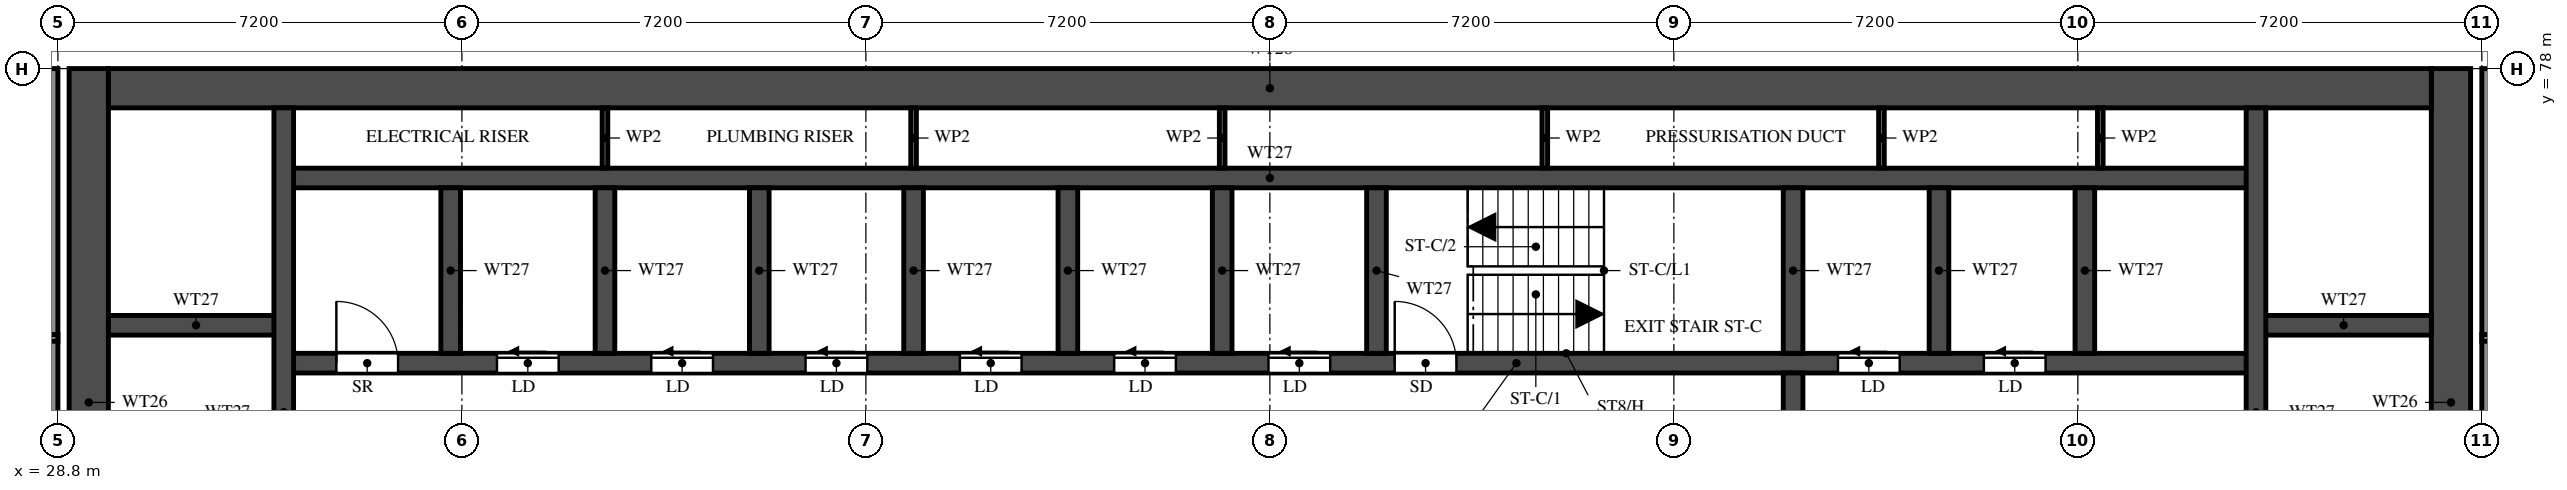
"""IFC4 building model, lengths in metres.
Left out: names, types, materials, properties, quantities, classifications, styles, units other than length and angle.
Written with IfcOpenShell. Run it as: python <this file> out.ifc"""

import sys

from ifc_helpers import new_model, si_unit, direction, frame, frame_2d, origin, place, context, subcontext, project, spatial, rectangle, extrude, element, fill, save


model = new_model("IFC4")
c1 = context("Model", 3, precision=1e-05, world=origin(), true_north=direction((0.0, 1.0)))
c2 = subcontext(c1, "Body", "Model", "MODEL_VIEW")
j1 = project(units=[si_unit("LENGTHUNIT", "METRE"), si_unit("PLANEANGLEUNIT", "RADIAN")], contexts=[c1])
p1 = place(None, origin())
s1 = spatial("IfcSite", under=j1, at=p1, CompositionType="ELEMENT")
p2 = place(p1, origin())
s2 = spatial("IfcBuilding", under=s1, at=p2, CompositionType="ELEMENT")
p3 = place(p2, frame((0.0, 0.0, 188.5)))
s3 = spatial("IfcBuildingStorey", under=s2, at=p3, CompositionType="ELEMENT", Elevation=188.5)
for number, where, z_axis, x_axis in (
    (1, (29.35, 66.1, 0.0), (0.0, 0.0, 1.0), (0.0, 1.0, 0.0)),
    (2, (71.45, 66.1, 0.0), (0.0, 0.0, 1.0), (0.0, 1.0, 0.0)),
):
    element("IfcWall", number, at=place(p3, frame(where, z_axis=z_axis, x_axis=x_axis)), inside=s3, PredefinedType="SHEAR", context=c2, shape_type="SweptSolid", body=[
        extrude(rectangle(XDim=11.9, YDim=0.7, at=frame_2d((5.95, 0.0))), origin(), (0.0, 0.0, 1.0), 3.2),
    ])
p4 = place(p3, frame((29.7, 77.65, 0.0), z_axis=(0.0, 0.0, 1.0), x_axis=(1.0, 0.0, 0.0)))
e3 = element("IfcWall", 3, at=p4, inside=s3, PredefinedType="SHEAR", context=c2, shape_type="SweptSolid", body=[
    extrude(rectangle(XDim=41.4, YDim=0.7, at=frame_2d((20.7, 0.0))), origin(), (0.0, 0.0, 1.0), 3.2),
])
p5 = place(p3, frame((32.825, 72.75, 0.0), z_axis=(0.0, 0.0, 1.0), x_axis=(1.0, 0.0, 0.0)))
e4 = element("IfcWall", 4, at=p5, inside=s3, PredefinedType="SHEAR", context=c2, shape_type="SweptSolid", body=[
    extrude(rectangle(XDim=35.15, YDim=0.35, at=frame_2d((17.575, 0.0))), origin(), (0.0, 0.0, 1.0), 3.2),
])
p6 = place(p5, frame((19.8, 0.0, 0.0)))
e5 = element("IfcOpeningElement", 5, at=p6, cuts=e4, PredefinedType="OPENING", context=c2, shape_type="SweptSolid", body=[
    extrude(rectangle(XDim=1.1, YDim=2.1, at=frame_2d((0.55, 1.05))), frame((0.0, 0.185, 0.0), z_axis=(0.0, -1.0, 0.0), x_axis=(1.0, 0.0, 0.0)), (0.0, 0.0, 1.0), 0.37),
])
p7 = place(p5, frame((27.7, 0.0, 0.0)))
e6 = element("IfcOpeningElement", 6, at=p7, cuts=e4, PredefinedType="OPENING", context=c2, shape_type="SweptSolid", body=[
    extrude(rectangle(XDim=1.1, YDim=2.1, at=frame_2d((0.55, 1.05))), frame((0.0, 0.185, 0.0), z_axis=(0.0, -1.0, 0.0), x_axis=(1.0, 0.0, 0.0)), (0.0, 0.0, 1.0), 0.37),
])
p8 = place(p5, frame((30.3, 0.0, 0.0)))
e7 = element("IfcOpeningElement", 7, at=p8, cuts=e4, PredefinedType="OPENING", context=c2, shape_type="SweptSolid", body=[
    extrude(rectangle(XDim=1.1, YDim=2.1, at=frame_2d((0.55, 1.05))), frame((0.0, 0.185, 0.0), z_axis=(0.0, -1.0, 0.0), x_axis=(1.0, 0.0, 0.0)), (0.0, 0.0, 1.0), 0.37),
])
p9 = place(p5, frame((3.8, 0.0, 0.0)))
e8 = element("IfcOpeningElement", 8, at=p9, cuts=e4, PredefinedType="OPENING", context=c2, shape_type="SweptSolid", body=[
    extrude(rectangle(XDim=1.1, YDim=2.1, at=frame_2d((0.55, 1.05))), frame((0.0, 0.185, 0.0), z_axis=(0.0, -1.0, 0.0), x_axis=(1.0, 0.0, 0.0)), (0.0, 0.0, 1.0), 0.37),
])
p10 = place(p5, frame((6.55, 0.0, 0.0)))
e9 = element("IfcOpeningElement", 9, at=p10, cuts=e4, PredefinedType="OPENING", context=c2, shape_type="SweptSolid", body=[
    extrude(rectangle(XDim=1.1, YDim=2.1, at=frame_2d((0.55, 1.05))), frame((0.0, 0.185, 0.0), z_axis=(0.0, -1.0, 0.0), x_axis=(1.0, 0.0, 0.0)), (0.0, 0.0, 1.0), 0.37),
])
p11 = place(p5, frame((9.3, 0.0, 0.0)))
e10 = element("IfcOpeningElement", 10, at=p11, cuts=e4, PredefinedType="OPENING", context=c2, shape_type="SweptSolid", body=[
    extrude(rectangle(XDim=1.1, YDim=2.1, at=frame_2d((0.55, 1.05))), frame((0.0, 0.185, 0.0), z_axis=(0.0, -1.0, 0.0), x_axis=(1.0, 0.0, 0.0)), (0.0, 0.0, 1.0), 0.37),
])
p12 = place(p5, frame((12.05, 0.0, 0.0)))
e11 = element("IfcOpeningElement", 11, at=p12, cuts=e4, PredefinedType="OPENING", context=c2, shape_type="SweptSolid", body=[
    extrude(rectangle(XDim=1.1, YDim=2.1, at=frame_2d((0.55, 1.05))), frame((0.0, 0.185, 0.0), z_axis=(0.0, -1.0, 0.0), x_axis=(1.0, 0.0, 0.0)), (0.0, 0.0, 1.0), 0.37),
])
p13 = place(p5, frame((14.8, 0.0, 0.0)))
e12 = element("IfcOpeningElement", 12, at=p13, cuts=e4, PredefinedType="OPENING", context=c2, shape_type="SweptSolid", body=[
    extrude(rectangle(XDim=1.1, YDim=2.1, at=frame_2d((0.55, 1.05))), frame((0.0, 0.185, 0.0), z_axis=(0.0, -1.0, 0.0), x_axis=(1.0, 0.0, 0.0)), (0.0, 0.0, 1.0), 0.37),
])
p14 = place(p5, frame((17.55, 0.0, 0.0)))
e13 = element("IfcOpeningElement", 13, at=p14, cuts=e4, PredefinedType="OPENING", context=c2, shape_type="SweptSolid", body=[
    extrude(rectangle(XDim=1.1, YDim=2.1, at=frame_2d((0.55, 1.05))), frame((0.0, 0.185, 0.0), z_axis=(0.0, -1.0, 0.0), x_axis=(1.0, 0.0, 0.0)), (0.0, 0.0, 1.0), 0.37),
])
p15 = place(p5, frame((0.938, 0.0, 0.0)))
e14 = element("IfcOpeningElement", 14, at=p15, cuts=e4, PredefinedType="OPENING", context=c2, shape_type="SweptSolid", body=[
    extrude(rectangle(XDim=1.1, YDim=2.1, at=frame_2d((0.55, 1.05))), frame((0.0, 0.185, 0.0), z_axis=(0.0, -1.0, 0.0), x_axis=(1.0, 0.0, 0.0)), (0.0, 0.0, 1.0), 0.37),
])
p16 = place(p3, frame((32.825, 76.05, 0.0), z_axis=(0.0, 0.0, 1.0), x_axis=(1.0, 0.0, 0.0)))
e15 = element("IfcWall", 15, at=p16, inside=s3, PredefinedType="SHEAR", context=c2, shape_type="SweptSolid", body=[
    extrude(rectangle(XDim=35.15, YDim=0.35, at=frame_2d((17.575, 0.0))), origin(), (0.0, 0.0, 1.0), 3.2),
])
for number, where, z_axis, x_axis in (
    (16, (29.7, 73.425, 0.0), (0.0, 0.0, 1.0), (1.0, 0.0, 0.0)),
    (17, (67.975, 73.425, 0.0), (0.0, 0.0, 1.0), (1.0, 0.0, 0.0)),
):
    element("IfcWall", number, at=place(p3, frame(where, z_axis=z_axis, x_axis=x_axis)), inside=s3, PredefinedType="SHEAR", context=c2, shape_type="SweptSolid", body=[
        extrude(rectangle(XDim=3.125, YDim=0.35, at=frame_2d((1.562, 0.0))), origin(), (0.0, 0.0, 1.0), 3.2),
    ])
p17 = place(p3, frame((32.825, 66.45, 0.0), z_axis=(0.0, 0.0, 1.0), x_axis=(0.0, 1.0, 0.0)))
e18 = element("IfcWall", 18, at=p17, inside=s3, PredefinedType="SHEAR", context=c2, shape_type="SweptSolid", body=[
    extrude(rectangle(XDim=10.85, YDim=0.35, at=frame_2d((5.425, 0.0))), origin(), (0.0, 0.0, 1.0), 3.2),
])
p18 = place(p3, frame((67.975, 66.45, 0.0), z_axis=(0.0, 0.0, 1.0), x_axis=(0.0, 1.0, 0.0)))
e19 = element("IfcWall", 19, at=p18, inside=s3, PredefinedType="SHEAR", context=c2, shape_type="SweptSolid", body=[
    extrude(rectangle(XDim=10.85, YDim=0.35, at=frame_2d((5.425, 0.0))), origin(), (0.0, 0.0, 1.0), 3.2),
])
p19 = place(p18, frame((0.15, 0.0, 0.0)))
e20 = element("IfcOpeningElement", 20, at=p19, cuts=e19, PredefinedType="OPENING", context=c2, shape_type="SweptSolid", body=[
    extrude(rectangle(XDim=1.1, YDim=2.1, at=frame_2d((0.55, 1.05))), frame((0.0, 0.185, 0.0), z_axis=(0.0, -1.0, 0.0), x_axis=(1.0, 0.0, 0.0)), (0.0, 0.0, 1.0), 0.37),
])
p20 = place(p3, frame((59.725, 66.45, 0.0), z_axis=(0.0, 0.0, 1.0), x_axis=(0.0, 1.0, 0.0)))
e21 = element("IfcWall", 21, at=p20, inside=s3, PredefinedType="SHEAR", context=c2, shape_type="SweptSolid", body=[
    extrude(rectangle(XDim=6.125, YDim=0.35, at=frame_2d((3.062, 0.0))), origin(), (0.0, 0.0, 1.0), 3.2),
])
p21 = place(p20, frame((3.85, 0.0, 0.0)))
e22 = element("IfcOpeningElement", 22, at=p21, cuts=e21, PredefinedType="OPENING", context=c2, shape_type="SweptSolid", body=[
    extrude(rectangle(XDim=1.2, YDim=2.1, at=frame_2d((0.6, 1.05))), frame((0.0, 0.185, 0.0), z_axis=(0.0, -1.0, 0.0), x_axis=(1.0, 0.0, 0.0)), (0.0, 0.0, 1.0), 0.37),
])
for number, where, z_axis, x_axis in (
    (23, (59.725, 72.925, 0.0), (0.0, 0.0, 1.0), (0.0, 1.0, 0.0)),
    (24, (35.8, 72.925, 0.0), (0.0, 0.0, 1.0), (0.0, 1.0, 0.0)),
    (25, (38.55, 72.925, 0.0), (0.0, 0.0, 1.0), (0.0, 1.0, 0.0)),
    (26, (41.3, 72.925, 0.0), (0.0, 0.0, 1.0), (0.0, 1.0, 0.0)),
    (27, (44.05, 72.925, 0.0), (0.0, 0.0, 1.0), (0.0, 1.0, 0.0)),
    (28, (46.8, 72.925, 0.0), (0.0, 0.0, 1.0), (0.0, 1.0, 0.0)),
    (29, (49.55, 72.925, 0.0), (0.0, 0.0, 1.0), (0.0, 1.0, 0.0)),
    (30, (52.3, 72.925, 0.0), (0.0, 0.0, 1.0), (0.0, 1.0, 0.0)),
    (31, (62.325, 72.925, 0.0), (0.0, 0.0, 1.0), (0.0, 1.0, 0.0)),
    (32, (64.925, 72.925, 0.0), (0.0, 0.0, 1.0), (0.0, 1.0, 0.0)),
):
    element("IfcWall", number, at=place(p3, frame(where, z_axis=z_axis, x_axis=x_axis)), inside=s3, PredefinedType="SHEAR", context=c2, shape_type="SweptSolid", body=[
        extrude(rectangle(XDim=2.95, YDim=0.35, at=frame_2d((1.475, 0.0))), origin(), (0.0, 0.0, 1.0), 3.2),
    ])
for number, where, z_axis, x_axis in (
    (33, (38.55, 76.225, 0.0), (0.0, 0.0, 1.0), (0.0, 1.0, 0.0)),
    (34, (44.05, 76.225, 0.0), (0.0, 0.0, 1.0), (0.0, 1.0, 0.0)),
    (35, (49.55, 76.225, 0.0), (0.0, 0.0, 1.0), (0.0, 1.0, 0.0)),
    (36, (55.3, 76.225, 0.0), (0.0, 0.0, 1.0), (0.0, 1.0, 0.0)),
    (37, (61.3, 76.225, 0.0), (0.0, 0.0, 1.0), (0.0, 1.0, 0.0)),
    (38, (65.2, 76.225, 0.0), (0.0, 0.0, 1.0), (0.0, 1.0, 0.0)),
):
    element("IfcWall", number, at=place(p3, frame(where, z_axis=z_axis, x_axis=x_axis)), inside=s3, PredefinedType="PARTITIONING", context=c2, shape_type="SweptSolid", body=[
        extrude(rectangle(XDim=1.075, YDim=0.1, at=frame_2d((0.538, 0.0))), origin(), (0.0, 0.0, 1.0), 3.2),
    ])
for number, where, z_axis, x_axis in (
    (39, (28.7, 62.4, 0.0), (0.0, 0.0, 1.0), (0.0, 1.0, 0.0)),
    (40, (72.1, 62.4, 0.0), (0.0, 0.0, 1.0), (0.0, 1.0, 0.0)),
):
    element("IfcWall", number, at=place(p3, frame(where, z_axis=z_axis, x_axis=x_axis)), inside=s3, PredefinedType="SOLIDWALL", context=c2, shape_type="SweptSolid", body=[
        extrude(rectangle(XDim=15.6, YDim=0.2, at=frame_2d((7.8, 0.0))), origin(), (0.0, 0.0, 1.0), 3.2),
    ])
p22 = place(p3, frame((14.525, 73.2, 0.0), z_axis=(0.0, 0.0, 1.0), x_axis=(1.0, 0.0, 0.0)))
e41 = element("IfcWall", 41, at=p22, inside=s3, PredefinedType="PARTITIONING", context=c2, shape_type="SweptSolid", body=[
    extrude(rectangle(XDim=14.275, YDim=0.12, at=frame_2d((7.138, 0.0))), origin(), (0.0, 0.0, 1.0), 2.3),
])
p23 = place(p22, frame((7.675, 0.0, 0.0)))
e42 = element("IfcOpeningElement", 42, at=p23, cuts=e41, PredefinedType="OPENING", context=c2, shape_type="SweptSolid", body=[
    extrude(rectangle(XDim=0.9, YDim=2.1, at=frame_2d((0.45, 1.05))), frame((0.0, 0.07, 0.0), z_axis=(0.0, -1.0, 0.0), x_axis=(1.0, 0.0, 0.0)), (0.0, 0.0, 1.0), 0.14),
])
p24 = place(p3, frame((72.0, 73.2, 0.0), z_axis=(0.0, 0.0, 1.0), x_axis=(1.0, 0.0, 0.0)))
e43 = element("IfcWall", 43, at=p24, inside=s3, PredefinedType="PARTITIONING", context=c2, shape_type="SweptSolid", body=[
    extrude(rectangle(XDim=14.275, YDim=0.12, at=frame_2d((7.137, 0.0))), origin(), (0.0, 0.0, 1.0), 2.3),
])
p25 = place(p24, frame((5.7, 0.0, 0.0)))
e44 = element("IfcOpeningElement", 44, at=p25, cuts=e43, PredefinedType="OPENING", context=c2, shape_type="SweptSolid", body=[
    extrude(rectangle(XDim=0.9, YDim=2.1, at=frame_2d((0.45, 1.05))), frame((0.0, 0.07, 0.0), z_axis=(0.0, -1.0, 0.0), x_axis=(1.0, 0.0, 0.0)), (0.0, 0.0, 1.0), 0.14),
])
p26 = place(p6, origin())
e45 = element("IfcDoor", 45, at=p26, inside=s3, OperationType="SINGLE_SWING_LEFT", PredefinedType="DOOR", context=c2, shape_type="SweptSolid", body=[
    extrude(rectangle(XDim=1.1, YDim=2.1, at=frame_2d((0.55, 1.05))), frame((0.0, 0.025, 0.0), z_axis=(0.0, -1.0, 0.0), x_axis=(1.0, 0.0, 0.0)), (0.0, 0.0, 1.0), 0.05),
])
fill(e5, e45)
p27 = place(p7, origin())
e46 = element("IfcDoor", 46, at=p27, inside=s3, OperationType="SLIDING_TO_LEFT", PredefinedType="DOOR", context=c2, shape_type="SweptSolid", body=[
    extrude(rectangle(XDim=1.1, YDim=2.1, at=frame_2d((0.55, 1.05))), frame((0.0, 0.025, 0.0), z_axis=(0.0, -1.0, 0.0), x_axis=(1.0, 0.0, 0.0)), (0.0, 0.0, 1.0), 0.05),
])
fill(e6, e46)
p28 = place(p8, origin())
e47 = element("IfcDoor", 47, at=p28, inside=s3, OperationType="SLIDING_TO_LEFT", PredefinedType="DOOR", context=c2, shape_type="SweptSolid", body=[
    extrude(rectangle(XDim=1.1, YDim=2.1, at=frame_2d((0.55, 1.05))), frame((0.0, 0.025, 0.0), z_axis=(0.0, -1.0, 0.0), x_axis=(1.0, 0.0, 0.0)), (0.0, 0.0, 1.0), 0.05),
])
fill(e7, e47)
p29 = place(p9, origin())
e48 = element("IfcDoor", 48, at=p29, inside=s3, OperationType="SLIDING_TO_LEFT", PredefinedType="DOOR", context=c2, shape_type="SweptSolid", body=[
    extrude(rectangle(XDim=1.1, YDim=2.1, at=frame_2d((0.55, 1.05))), frame((0.0, 0.025, 0.0), z_axis=(0.0, -1.0, 0.0), x_axis=(1.0, 0.0, 0.0)), (0.0, 0.0, 1.0), 0.05),
])
fill(e8, e48)
p30 = place(p10, origin())
e49 = element("IfcDoor", 49, at=p30, inside=s3, OperationType="SLIDING_TO_LEFT", PredefinedType="DOOR", context=c2, shape_type="SweptSolid", body=[
    extrude(rectangle(XDim=1.1, YDim=2.1, at=frame_2d((0.55, 1.05))), frame((0.0, 0.025, 0.0), z_axis=(0.0, -1.0, 0.0), x_axis=(1.0, 0.0, 0.0)), (0.0, 0.0, 1.0), 0.05),
])
fill(e9, e49)
p31 = place(p11, origin())
e50 = element("IfcDoor", 50, at=p31, inside=s3, OperationType="SLIDING_TO_LEFT", PredefinedType="DOOR", context=c2, shape_type="SweptSolid", body=[
    extrude(rectangle(XDim=1.1, YDim=2.1, at=frame_2d((0.55, 1.05))), frame((0.0, 0.025, 0.0), z_axis=(0.0, -1.0, 0.0), x_axis=(1.0, 0.0, 0.0)), (0.0, 0.0, 1.0), 0.05),
])
fill(e10, e50)
p32 = place(p12, origin())
e51 = element("IfcDoor", 51, at=p32, inside=s3, OperationType="SLIDING_TO_LEFT", PredefinedType="DOOR", context=c2, shape_type="SweptSolid", body=[
    extrude(rectangle(XDim=1.1, YDim=2.1, at=frame_2d((0.55, 1.05))), frame((0.0, 0.025, 0.0), z_axis=(0.0, -1.0, 0.0), x_axis=(1.0, 0.0, 0.0)), (0.0, 0.0, 1.0), 0.05),
])
fill(e11, e51)
p33 = place(p13, origin())
e52 = element("IfcDoor", 52, at=p33, inside=s3, OperationType="SLIDING_TO_LEFT", PredefinedType="DOOR", context=c2, shape_type="SweptSolid", body=[
    extrude(rectangle(XDim=1.1, YDim=2.1, at=frame_2d((0.55, 1.05))), frame((0.0, 0.025, 0.0), z_axis=(0.0, -1.0, 0.0), x_axis=(1.0, 0.0, 0.0)), (0.0, 0.0, 1.0), 0.05),
])
fill(e12, e52)
p34 = place(p14, origin())
e53 = element("IfcDoor", 53, at=p34, inside=s3, OperationType="SLIDING_TO_LEFT", PredefinedType="DOOR", context=c2, shape_type="SweptSolid", body=[
    extrude(rectangle(XDim=1.1, YDim=2.1, at=frame_2d((0.55, 1.05))), frame((0.0, 0.025, 0.0), z_axis=(0.0, -1.0, 0.0), x_axis=(1.0, 0.0, 0.0)), (0.0, 0.0, 1.0), 0.05),
])
fill(e13, e53)
p35 = place(p15, origin())
e54 = element("IfcDoor", 54, at=p35, inside=s3, OperationType="SINGLE_SWING_LEFT", PredefinedType="DOOR", context=c2, shape_type="SweptSolid", body=[
    extrude(rectangle(XDim=1.1, YDim=2.1, at=frame_2d((0.55, 1.05))), frame((0.0, 0.025, 0.0), z_axis=(0.0, -1.0, 0.0), x_axis=(1.0, 0.0, 0.0)), (0.0, 0.0, 1.0), 0.05),
])
fill(e14, e54)
save(model, sys.argv[1])
